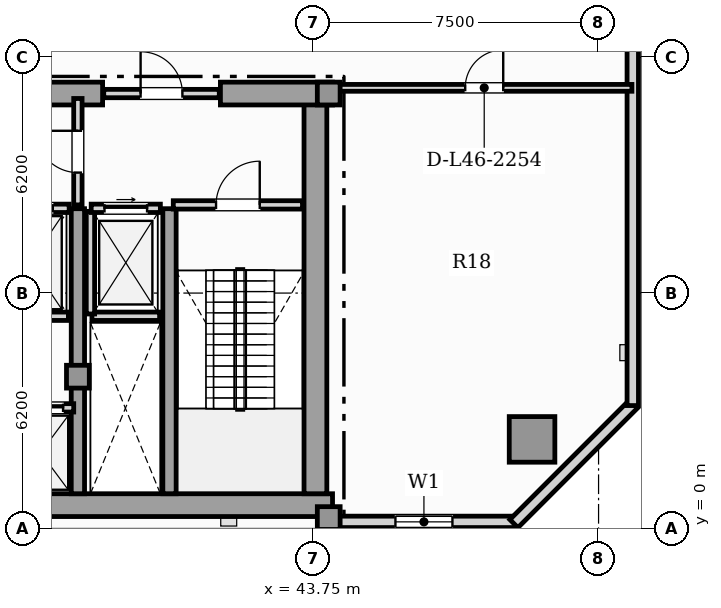
"""IFC4 building model, lengths in metres.
Left out: names, types, materials, properties, quantities, classifications, styles, units other than length and angle.
Written with IfcOpenShell. Run it as: python <this file> out.ifc"""

import sys

from ifc_helpers import new_model, si_unit, direction, frame, frame_2d, origin, origin_2d, place, context, subcontext, project, spatial, rectangle, hollow_rectangle, extrude, element, fill, save


model = new_model("IFC4")
c1 = context("Model", 3, precision=1e-05, world=origin(), true_north=direction((0.0, 1.0)))
c2 = subcontext(c1, "Body", "Model", "MODEL_VIEW")
j1 = project(units=[si_unit("LENGTHUNIT", "METRE"), si_unit("PLANEANGLEUNIT", "RADIAN")], contexts=[c1])
p1 = place(None, origin())
s1 = spatial("IfcSite", under=j1, at=p1, CompositionType="ELEMENT")
p2 = place(p1, origin())
s2 = spatial("IfcBuilding", under=s1, at=p2, CompositionType="ELEMENT")
p3 = place(p2, frame((0.0, 0.0, 187.55)))
s3 = spatial("IfcBuildingStorey", under=s2, at=p3, CompositionType="ELEMENT", Elevation=187.55)
p4 = place(p3, frame((13.25, 0.62, 0.0), z_axis=(0.0, 0.0, 1.0), x_axis=(1.0, 0.0, 0.0)))
e1 = element("IfcWall", 1, at=p4, inside=s3, PredefinedType="SHEAR", context=c2, shape_type="SweptSolid", body=[
    extrude(rectangle(XDim=31.0, YDim=0.6, at=frame_2d((15.5, 0.0))), origin(), (0.0, 0.0, 1.0), 4.83),
])
p5 = place(p3, frame((43.8, 0.92, 0.0), z_axis=(0.0, 0.0, 1.0), x_axis=(0.0, 1.0, 0.0)))
e2 = element("IfcWall", 2, at=p5, inside=s3, PredefinedType="SHEAR", context=c2, shape_type="SweptSolid", body=[
    extrude(rectangle(XDim=10.53, YDim=0.6, at=frame_2d((5.265, 0.0))), origin(), (0.0, 0.0, 1.0), 4.83),
])
p6 = place(p3, frame((30.9, 11.45, 0.0), z_axis=(0.0, 0.0, 1.0), x_axis=(1.0, 0.0, 0.0)))
e3 = element("IfcWall", 3, at=p6, inside=s3, PredefinedType="SHEAR", context=c2, shape_type="SweptSolid", body=[
    extrude(rectangle(XDim=7.3, YDim=0.6, at=frame_2d((3.65, 0.0))), origin(), (0.0, 0.0, 1.0), 4.83),
])
p7 = place(p3, frame((41.3, 11.45, 0.0), z_axis=(0.0, 0.0, 1.0), x_axis=(1.0, 0.0, 0.0)))
e4 = element("IfcWall", 4, at=p7, inside=s3, PredefinedType="SHEAR", context=c2, shape_type="SweptSolid", body=[
    extrude(rectangle(XDim=2.95, YDim=0.6, at=frame_2d((1.475, 0.0))), origin(), (0.0, 0.0, 1.0), 4.83),
])
for number, where, z_axis, x_axis in (
    (5, (37.55, 0.92, 0.0), (0.0, 0.0, 1.0), (0.0, 1.0, 0.0)),
    (6, (39.96, 0.92, 0.0), (0.0, 0.0, 1.0), (0.0, 1.0, 0.0)),
):
    element("IfcWall", number, at=place(p3, frame(where, z_axis=z_axis, x_axis=x_axis)), inside=s3, PredefinedType="SHEAR", context=c2, shape_type="SweptSolid", body=[
        extrude(rectangle(XDim=7.5, YDim=0.35, at=frame_2d((3.75, 0.0))), origin(), (0.0, 0.0, 1.0), 4.83),
    ])
for number, where, z_axis, x_axis in (
    (7, (44.15, 0.28, 0.0), (0.0, 0.0, 1.0), (1.0, 0.0, 0.0)),
    (8, (44.15, 11.45, 0.0), (0.0, 0.0, 1.0), (1.0, 0.0, 0.0)),
    (9, (37.55, 4.0, 0.0), (0.0, 0.0, 1.0), (1.0, 0.0, 0.0)),
):
    element("IfcColumn", number, at=place(p3, frame(where, z_axis=z_axis, x_axis=x_axis)), inside=s3, PredefinedType="COLUMN", context=c2, shape_type="SweptSolid", body=[
        extrude(rectangle(XDim=0.6, YDim=0.6, at=origin_2d()), origin(), (0.0, 0.0, 1.0), 5.05),
    ])
p8 = place(p3, frame((49.5, 2.35, 0.0), z_axis=(0.0, 0.0, 1.0), x_axis=(1.0, 0.0, 0.0)))
e10 = element("IfcColumn", 10, at=p8, inside=s3, PredefinedType="USERDEFINED", context=c2, shape_type="SweptSolid", body=[
    extrude(hollow_rectangle(XDim=1.2, YDim=1.2, WallThickness=0.07, at=origin_2d()), origin(), (0.0, 0.0, 1.0), 5.05),
])
p9 = place(p3, frame((44.25, 0.18, 0.0), z_axis=(0.0, 0.0, 1.0), x_axis=(1.0, 0.0, 0.0)))
e11 = element("IfcWall", 11, at=p9, inside=s3, PredefinedType="SOLIDWALL", context=c2, shape_type="SweptSolid", body=[
    extrude(rectangle(XDim=4.81, YDim=0.3, at=frame_2d((2.405, 0.0))), origin(), (0.0, 0.0, 1.0), 4.83),
])
p10 = place(p9, frame((1.655, 0.0, 0.9)))
e12 = element("IfcOpeningElement", 12, at=p10, cuts=e11, PredefinedType="OPENING", context=c2, shape_type="SweptSolid", body=[
    extrude(rectangle(XDim=1.5, YDim=1.95, at=frame_2d((0.75, 0.975))), frame((0.0, 0.16, 0.0), z_axis=(0.0, -1.0, 0.0), x_axis=(1.0, 0.0, 0.0)), (0.0, 0.0, 1.0), 0.32),
])
p11 = place(p3, frame((49.022, 0.135, 0.0), z_axis=(0.0, 0.0, 1.0), x_axis=(0.707106781187, 0.707106781187, 0.0)))
e13 = element("IfcWall", 13, at=p11, inside=s3, PredefinedType="SOLIDWALL", context=c2, shape_type="SweptSolid", body=[
    extrude(rectangle(XDim=4.445, YDim=0.3, at=frame_2d((2.223, 0.0))), origin(), (0.0, 0.0, 1.0), 4.83),
])
p12 = place(p3, frame((52.15, 3.24, 0.0), z_axis=(0.0, 0.0, 1.0), x_axis=(0.0, 1.0, 0.0)))
e14 = element("IfcWall", 14, at=p12, inside=s3, PredefinedType="SOLIDWALL", context=c2, shape_type="SweptSolid", body=[
    extrude(rectangle(XDim=33.92, YDim=0.3, at=frame_2d((16.96, 0.0))), origin(), (0.0, 0.0, 1.0), 4.83),
])
p13 = place(p12, frame((30.56, 0.0, 0.95)))
e15 = element("IfcOpeningElement", 15, at=p13, cuts=e14, PredefinedType="OPENING", context=c2, shape_type="SweptSolid", body=[
    extrude(rectangle(XDim=0.9, YDim=1.5, at=frame_2d((0.45, 0.75))), frame((0.0, 0.16, 0.0), z_axis=(0.0, -1.0, 0.0), x_axis=(1.0, 0.0, 0.0)), (0.0, 0.0, 1.0), 0.32),
])
p14 = place(p12, frame((10.805, 0.0, 0.9)))
e16 = element("IfcOpeningElement", 16, at=p14, cuts=e14, PredefinedType="OPENING", context=c2, shape_type="SweptSolid", body=[
    extrude(rectangle(XDim=1.5, YDim=1.95, at=frame_2d((0.75, 0.975))), frame((0.0, 0.16, 0.0), z_axis=(0.0, -1.0, 0.0), x_axis=(1.0, 0.0, 0.0)), (0.0, 0.0, 1.0), 0.32),
])
p15 = place(p12, frame((14.462, 0.0, 0.9)))
e17 = element("IfcOpeningElement", 17, at=p15, cuts=e14, PredefinedType="OPENING", context=c2, shape_type="SweptSolid", body=[
    extrude(rectangle(XDim=1.5, YDim=1.95, at=frame_2d((0.75, 0.975))), frame((0.0, 0.16, 0.0), z_axis=(0.0, -1.0, 0.0), x_axis=(1.0, 0.0, 0.0)), (0.0, 0.0, 1.0), 0.32),
])
p16 = place(p12, frame((19.726, 0.0, 0.9)))
e18 = element("IfcOpeningElement", 18, at=p16, cuts=e14, PredefinedType="OPENING", context=c2, shape_type="SweptSolid", body=[
    extrude(rectangle(XDim=1.5, YDim=1.95, at=frame_2d((0.75, 0.975))), frame((0.0, 0.16, 0.0), z_axis=(0.0, -1.0, 0.0), x_axis=(1.0, 0.0, 0.0)), (0.0, 0.0, 1.0), 0.32),
])
p17 = place(p12, frame((25.934, 0.0, 0.9)))
e19 = element("IfcOpeningElement", 19, at=p17, cuts=e14, PredefinedType="OPENING", context=c2, shape_type="SweptSolid", body=[
    extrude(rectangle(XDim=1.5, YDim=1.95, at=frame_2d((0.75, 0.975))), frame((0.0, 0.16, 0.0), z_axis=(0.0, -1.0, 0.0), x_axis=(1.0, 0.0, 0.0)), (0.0, 0.0, 1.0), 0.32),
])
p18 = place(p12, frame((32.24, 0.0, 0.95)))
e20 = element("IfcOpeningElement", 20, at=p18, cuts=e14, PredefinedType="OPENING", context=c2, shape_type="SweptSolid", body=[
    extrude(rectangle(XDim=0.9, YDim=1.5, at=frame_2d((0.45, 0.75))), frame((0.0, 0.16, 0.0), z_axis=(0.0, -1.0, 0.0), x_axis=(1.0, 0.0, 0.0)), (0.0, 0.0, 1.0), 0.32),
])
p19 = place(p3, frame((37.92, 5.59, 0.0), z_axis=(0.0, 0.0, 1.0), x_axis=(1.0, 0.0, 0.0)))
e21 = element("IfcWall", 21, at=p19, inside=s3, PredefinedType="SOLIDWALL", context=c2, shape_type="SweptSolid", body=[
    extrude(rectangle(XDim=1.78, YDim=0.22, at=frame_2d((0.89, 0.0))), origin(), (0.0, 0.0, 1.0), 4.83),
])
p20 = place(p3, frame((37.88, 5.65, 0.0), z_axis=(0.0, 0.0, 1.0), x_axis=(0.0, 1.0, 0.0)))
e22 = element("IfcWall", 22, at=p20, inside=s3, PredefinedType="SOLIDWALL", context=c2, shape_type="SweptSolid", body=[
    extrude(rectangle(XDim=2.7, YDim=0.22, at=frame_2d((1.35, 0.0))), origin(), (0.0, 0.0, 1.0), 4.83),
])
p21 = place(p3, frame((37.9, 8.43, 0.0), z_axis=(0.0, 0.0, 1.0), x_axis=(1.0, 0.0, 0.0)))
e23 = element("IfcWall", 23, at=p21, inside=s3, PredefinedType="SOLIDWALL", context=c2, shape_type="SweptSolid", body=[
    extrude(rectangle(XDim=1.82, YDim=0.22, at=frame_2d((0.91, 0.0))), origin(), (0.0, 0.0, 1.0), 4.83),
])
p22 = place(p21, frame((0.35, 0.0, 0.0)))
e24 = element("IfcOpeningElement", 24, at=p22, cuts=e23, PredefinedType="OPENING", context=c2, shape_type="SweptSolid", body=[
    extrude(rectangle(XDim=1.12, YDim=2.25, at=frame_2d((0.56, 1.125))), frame((0.0, 0.12, 0.0), z_axis=(0.0, -1.0, 0.0), x_axis=(1.0, 0.0, 0.0)), (0.0, 0.0, 1.0), 0.24),
])
p23 = place(p3, frame((35.3, 5.59, 0.0), z_axis=(0.0, 0.0, 1.0), x_axis=(1.0, 0.0, 0.0)))
e25 = element("IfcWall", 25, at=p23, inside=s3, PredefinedType="SOLIDWALL", context=c2, shape_type="SweptSolid", body=[
    extrude(rectangle(XDim=2.0, YDim=0.22, at=frame_2d((1.0, 0.0))), origin(), (0.0, 0.0, 1.0), 4.83),
])
p24 = place(p3, frame((35.28, 8.43, 0.0), z_axis=(0.0, 0.0, 1.0), x_axis=(1.0, 0.0, 0.0)))
e26 = element("IfcWall", 26, at=p24, inside=s3, PredefinedType="SOLIDWALL", context=c2, shape_type="SweptSolid", body=[
    extrude(rectangle(XDim=2.04, YDim=0.22, at=frame_2d((1.02, 0.0))), origin(), (0.0, 0.0, 1.0), 4.83),
])
p25 = place(p24, frame((0.43, 0.0, 0.0)))
e27 = element("IfcOpeningElement", 27, at=p25, cuts=e26, PredefinedType="OPENING", context=c2, shape_type="SweptSolid", body=[
    extrude(rectangle(XDim=1.18, YDim=2.2, at=frame_2d((0.59, 1.1))), frame((0.0, 0.12, 0.0), z_axis=(0.0, -1.0, 0.0), x_axis=(1.0, 0.0, 0.0)), (0.0, 0.0, 1.0), 0.24),
])
p26 = place(p3, frame((35.7, 3.18, 0.0), z_axis=(0.0, 0.0, 1.0), x_axis=(1.0, 0.0, 0.0)))
e28 = element("IfcWall", 28, at=p26, inside=s3, PredefinedType="SOLIDWALL", context=c2, shape_type="SweptSolid", body=[
    extrude(rectangle(XDim=1.74, YDim=0.22, at=frame_2d((0.87, 0.0))), origin(), (0.0, 0.0, 1.0), 4.83),
])
p27 = place(p26, frame((0.28, 0.0, 0.0)))
e29 = element("IfcOpeningElement", 29, at=p27, cuts=e28, PredefinedType="OPENING", context=c2, shape_type="SweptSolid", body=[
    extrude(rectangle(XDim=1.18, YDim=2.2, at=frame_2d((0.59, 1.1))), frame((0.0, 0.12, 0.0), z_axis=(0.0, -1.0, 0.0), x_axis=(1.0, 0.0, 0.0)), (0.0, 0.0, 1.0), 0.24),
])
p28 = place(p3, frame((40.06, 8.52, 0.0), z_axis=(0.0, 0.0, 1.0), x_axis=(1.0, 0.0, 0.0)))
e30 = element("IfcWall", 30, at=p28, inside=s3, PredefinedType="SOLIDWALL", context=c2, shape_type="SweptSolid", body=[
    extrude(rectangle(XDim=3.4, YDim=0.22, at=frame_2d((1.7, 0.0))), origin(), (0.0, 0.0, 1.0), 4.83),
])
p29 = place(p28, frame((1.125, 0.0, 0.0)))
e31 = element("IfcOpeningElement", 31, at=p29, cuts=e30, PredefinedType="OPENING", context=c2, shape_type="SweptSolid", body=[
    extrude(rectangle(XDim=1.15, YDim=2.2, at=frame_2d((0.575, 1.1))), frame((0.0, 0.12, 0.0), z_axis=(0.0, -1.0, 0.0), x_axis=(1.0, 0.0, 0.0)), (0.0, 0.0, 1.0), 0.24),
])
p30 = place(p3, frame((37.55, 8.52, 0.0), z_axis=(0.0, 0.0, 1.0), x_axis=(0.0, 1.0, 0.0)))
e32 = element("IfcWall", 32, at=p30, inside=s3, PredefinedType="SOLIDWALL", context=c2, shape_type="SweptSolid", body=[
    extrude(rectangle(XDim=2.8, YDim=0.22, at=frame_2d((1.4, 0.0))), origin(), (0.0, 0.0, 1.0), 4.285),
])
p31 = place(p30, frame((0.85, 0.0, 0.0)))
e33 = element("IfcOpeningElement", 33, at=p31, cuts=e32, PredefinedType="OPENING", context=c2, shape_type="SweptSolid", body=[
    extrude(rectangle(XDim=1.1, YDim=2.2, at=frame_2d((0.55, 1.1))), frame((0.0, 0.12, 0.0), z_axis=(0.0, -1.0, 0.0), x_axis=(1.0, 0.0, 0.0)), (0.0, 0.0, 1.0), 0.24),
])
p32 = place(p3, frame((38.23, 11.45, 0.0), z_axis=(0.0, 0.0, 1.0), x_axis=(1.0, 0.0, 0.0)))
e34 = element("IfcWall", 34, at=p32, inside=s3, PredefinedType="SOLIDWALL", context=c2, shape_type="SweptSolid", body=[
    extrude(rectangle(XDim=3.04, YDim=0.22, at=frame_2d((1.52, 0.0))), origin(), (0.0, 0.0, 1.0), 4.83),
])
p33 = place(p32, frame((0.97, 0.0, 0.0)))
e35 = element("IfcOpeningElement", 35, at=p33, cuts=e34, PredefinedType="OPENING", context=c2, shape_type="SweptSolid", body=[
    extrude(rectangle(XDim=1.1, YDim=2.2, at=frame_2d((0.55, 1.1))), frame((0.0, 0.12, 0.0), z_axis=(0.0, -1.0, 0.0), x_axis=(1.0, 0.0, 0.0)), (0.0, 0.0, 1.0), 0.24),
])
p34 = place(p3, frame((44.355, 11.6, 0.0), z_axis=(0.0, 0.0, 1.0), x_axis=(1.0, 0.0, 0.0)))
e36 = element("IfcWall", 36, at=p34, inside=s3, PredefinedType="PARTITIONING", context=c2, shape_type="SweptSolid", body=[
    extrude(rectangle(XDim=7.772, YDim=0.18, at=frame_2d((3.886, 0.0))), origin(), (0.0, 0.0, 1.0), 4.83),
])
p35 = place(p34, frame((3.386, 0.0, 0.0)))
e37 = element("IfcOpeningElement", 37, at=p35, cuts=e36, PredefinedType="OPENING", context=c2, shape_type="SweptSolid", body=[
    extrude(rectangle(XDim=1.0, YDim=2.15, at=frame_2d((0.5, 1.075))), frame((0.0, 0.1, 0.0), z_axis=(0.0, -1.0, 0.0), x_axis=(1.0, 0.0, 0.0)), (0.0, 0.0, 1.0), 0.2),
])
p36 = place(p10, origin())
e38 = element("IfcWindow", 38, at=p36, inside=s3, PartitioningType="SINGLE_PANEL", PredefinedType="WINDOW", context=c2, shape_type="SweptSolid", body=[
    extrude(rectangle(XDim=1.5, YDim=1.95, at=frame_2d((0.75, 0.975))), frame((0.0, 0.03, 0.0), z_axis=(0.0, -1.0, 0.0), x_axis=(1.0, 0.0, 0.0)), (0.0, 0.0, 1.0), 0.06),
])
fill(e12, e38)
p37 = place(p22, origin())
e39 = element("IfcDoor", 39, at=p37, inside=s3, OperationType="SLIDING_TO_RIGHT", PredefinedType="DOOR", context=c2, shape_type="SweptSolid", body=[
    extrude(rectangle(XDim=1.12, YDim=2.25, at=frame_2d((0.56, 1.125))), frame((0.0, 0.025, 0.0), z_axis=(0.0, -1.0, 0.0), x_axis=(1.0, 0.0, 0.0)), (0.0, 0.0, 1.0), 0.05),
])
fill(e24, e39)
p38 = place(p25, origin())
e40 = element("IfcDoor", 40, at=p38, inside=s3, OperationType="SLIDING_TO_LEFT", PredefinedType="DOOR", context=c2, shape_type="SweptSolid", body=[
    extrude(rectangle(XDim=1.18, YDim=2.2, at=frame_2d((0.59, 1.1))), frame((0.0, 0.025, 0.0), z_axis=(0.0, -1.0, 0.0), x_axis=(1.0, 0.0, 0.0)), (0.0, 0.0, 1.0), 0.05),
])
fill(e27, e40)
p39 = place(p27, origin())
e41 = element("IfcDoor", 41, at=p39, inside=s3, OperationType="SLIDING_TO_RIGHT", PredefinedType="DOOR", context=c2, shape_type="SweptSolid", body=[
    extrude(rectangle(XDim=1.18, YDim=2.2, at=frame_2d((0.59, 1.1))), frame((0.0, 0.025, 0.0), z_axis=(0.0, -1.0, 0.0), x_axis=(1.0, 0.0, 0.0)), (0.0, 0.0, 1.0), 0.05),
])
fill(e29, e41)
p40 = place(p29, origin())
e42 = element("IfcDoor", 42, at=p40, inside=s3, OperationType="SINGLE_SWING_RIGHT", PredefinedType="DOOR", context=c2, shape_type="SweptSolid", body=[
    extrude(rectangle(XDim=1.15, YDim=2.2, at=frame_2d((0.575, 1.1))), frame((0.0, 0.025, 0.0), z_axis=(0.0, -1.0, 0.0), x_axis=(1.0, 0.0, 0.0)), (0.0, 0.0, 1.0), 0.05),
])
fill(e31, e42)
p41 = place(p31, origin())
e43 = element("IfcDoor", 43, at=p41, inside=s3, OperationType="SINGLE_SWING_RIGHT", PredefinedType="DOOR", context=c2, shape_type="SweptSolid", body=[
    extrude(rectangle(XDim=1.1, YDim=2.2, at=frame_2d((0.55, 1.1))), frame((0.0, 0.025, 0.0), z_axis=(0.0, -1.0, 0.0), x_axis=(1.0, 0.0, 0.0)), (0.0, 0.0, 1.0), 0.05),
])
fill(e33, e43)
p42 = place(p33, origin())
e44 = element("IfcDoor", 44, at=p42, inside=s3, OperationType="SINGLE_SWING_LEFT", PredefinedType="DOOR", context=c2, shape_type="SweptSolid", body=[
    extrude(rectangle(XDim=1.1, YDim=2.2, at=frame_2d((0.55, 1.1))), frame((0.0, 0.025, 0.0), z_axis=(0.0, -1.0, 0.0), x_axis=(1.0, 0.0, 0.0)), (0.0, 0.0, 1.0), 0.05),
])
fill(e35, e44)
p43 = place(p35, origin())
e45 = element("IfcDoor", 45, at=p43, inside=s3, OperationType="SINGLE_SWING_RIGHT", PredefinedType="DOOR", context=c2, shape_type="SweptSolid", body=[
    extrude(rectangle(XDim=1.0, YDim=2.15, at=frame_2d((0.5, 1.075))), frame((0.0, 0.025, 0.0), z_axis=(0.0, -1.0, 0.0), x_axis=(1.0, 0.0, 0.0)), (0.0, 0.0, 1.0), 0.05),
])
fill(e37, e45)
save(model, sys.argv[1])
